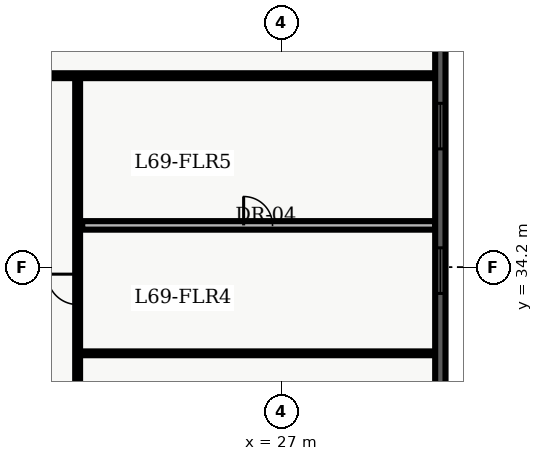
"""IFC4 building model, lengths in metres.
Left out: names, types, materials, properties, quantities, classifications, styles, units other than length and angle.
Written with IfcOpenShell. Run it as: python <this file> out.ifc"""

import sys

from ifc_helpers import new_model, entity, si_unit, converted_unit, direction, frame, origin_with_axes, origin_2d_with_axis, place, context, subcontext, project, spatial, polyline, rectangle, outline, extrude, element, fill, save


model = new_model("IFC4")
c1 = context("Model", 3, precision=1e-05, world=origin_with_axes(), true_north=direction((0.0, 1.0)))
c2 = subcontext(c1, "Body", "Model", "MODEL_VIEW")
j1 = project(units=[si_unit("LENGTHUNIT", "METRE"), converted_unit("PLANEANGLEUNIT", "DEGREE", entity("IfcPlaneAngleMeasure", 0.017), si_unit("PLANEANGLEUNIT", "RADIAN"), dimensions=[0, 0, 0, 0, 0, 0, 0])], contexts=[c1])
p1 = place(None, origin_with_axes())
s1 = spatial("IfcSite", under=j1, at=p1, CompositionType="ELEMENT")
p2 = place(p1, origin_with_axes())
s2 = spatial("IfcBuilding", under=s1, at=p2, CompositionType="ELEMENT")
p3 = place(p2, frame((0.0, 0.0, 280.2), z_axis=(0.0, 0.0, 1.0), x_axis=(1.0, 0.0, 0.0)))
s3 = spatial("IfcBuildingStorey", under=s2, at=p3, CompositionType="ELEMENT", Elevation=280.2)
p4 = place(p3, frame((8.135, 40.5, 0.0), z_axis=(0.0, 0.0, 1.0), x_axis=(1.0, 0.0, 0.0)))
e1 = element("IfcWall", 1, at=p4, inside=s3, PredefinedType="PARTITIONING", context=c2, shape_type="SweptSolid", body=[
    extrude(outline(polyline([(0.0, -0.08), (23.93, -0.08), (23.93, 0.08), (0.0, 0.08), (0.0, -0.08)])), origin_with_axes(), (0.0, 0.0, 1.0), 2.7),
])
p5 = place(p4, frame((0.871, 0.0, 0.0), z_axis=(0.0, 0.0, 1.0), x_axis=(1.0, 0.0, 0.0)))
e2 = element("IfcOpeningElement", 2, at=p5, cuts=e1, PredefinedType="OPENING", context=c2, shape_type="SweptSolid", body=[
    extrude(rectangle(XDim=1.0, YDim=0.18, at=origin_2d_with_axis()), origin_with_axes(), (0.0, 0.0, 1.0), 2.15),
])
p6 = place(p4, frame((6.56, 0.0, 0.0), z_axis=(0.0, 0.0, 1.0), x_axis=(1.0, 0.0, 0.0)))
e3 = element("IfcOpeningElement", 3, at=p6, cuts=e1, PredefinedType="OPENING", context=c2, shape_type="SweptSolid", body=[
    extrude(rectangle(XDim=1.0, YDim=0.18, at=origin_2d_with_axis()), origin_with_axes(), (0.0, 0.0, 1.0), 2.15),
])
p7 = place(p4, frame((10.16, 0.0, 0.0), z_axis=(0.0, 0.0, 1.0), x_axis=(1.0, 0.0, 0.0)))
e4 = element("IfcOpeningElement", 4, at=p7, cuts=e1, PredefinedType="OPENING", context=c2, shape_type="SweptSolid", body=[
    extrude(rectangle(XDim=1.0, YDim=0.18, at=origin_2d_with_axis()), origin_with_axes(), (0.0, 0.0, 1.0), 2.15),
])
p8 = place(p3, frame((20.3, 7.8, 0.0), z_axis=(0.0, 0.0, 1.0), x_axis=(0.0, 1.0, 0.0)))
e5 = element("IfcWall", 5, at=p8, inside=s3, PredefinedType="PARTITIONING", context=c2, shape_type="SweptSolid", body=[
    extrude(outline(polyline([(0.0, -0.08), (32.7, -0.08), (32.7, 0.08), (0.0, 0.08), (0.0, -0.08)])), origin_with_axes(), (0.0, 0.0, 1.0), 2.7),
])
p9 = place(p8, frame((14.2, 0.0, 0.0), z_axis=(0.0, 0.0, 1.0), x_axis=(1.0, 0.0, 0.0)))
e6 = element("IfcOpeningElement", 6, at=p9, cuts=e5, PredefinedType="OPENING", context=c2, shape_type="SweptSolid", body=[
    extrude(rectangle(XDim=1.0, YDim=0.18, at=origin_2d_with_axis()), origin_with_axes(), (0.0, 0.0, 1.0), 2.15),
])
p10 = place(p8, frame((18.24, 0.0, 0.0), z_axis=(0.0, 0.0, 1.0), x_axis=(1.0, 0.0, 0.0)))
e7 = element("IfcOpeningElement", 7, at=p10, cuts=e5, PredefinedType="OPENING", context=c2, shape_type="SweptSolid", body=[
    extrude(rectangle(XDim=1.0, YDim=0.18, at=origin_2d_with_axis()), origin_with_axes(), (0.0, 0.0, 1.0), 2.15),
])
p11 = place(p8, frame((22.011, 0.0, 0.0), z_axis=(0.0, 0.0, 1.0), x_axis=(1.0, 0.0, 0.0)))
e8 = element("IfcOpeningElement", 8, at=p11, cuts=e5, PredefinedType="OPENING", context=c2, shape_type="SweptSolid", body=[
    extrude(rectangle(XDim=1.0, YDim=0.18, at=origin_2d_with_axis()), origin_with_axes(), (0.0, 0.0, 1.0), 2.15),
])
p12 = place(p8, frame((25.672, 0.0, 0.0), z_axis=(0.0, 0.0, 1.0), x_axis=(1.0, 0.0, 0.0)))
e9 = element("IfcOpeningElement", 9, at=p12, cuts=e5, PredefinedType="OPENING", context=c2, shape_type="SweptSolid", body=[
    extrude(rectangle(XDim=1.0, YDim=0.18, at=origin_2d_with_axis()), origin_with_axes(), (0.0, 0.0, 1.0), 2.15),
])
p13 = place(p8, frame((6.675, 0.0, 0.0), z_axis=(0.0, 0.0, 1.0), x_axis=(1.0, 0.0, 0.0)))
e10 = element("IfcOpeningElement", 10, at=p13, cuts=e5, PredefinedType="OPENING", context=c2, shape_type="SweptSolid", body=[
    extrude(rectangle(XDim=1.05, YDim=0.18, at=origin_2d_with_axis()), origin_with_axes(), (0.0, 0.0, 1.0), 2.15),
])
p14 = place(p3, frame((20.45, 31.368, 0.0), z_axis=(0.0, 0.0, 1.0), x_axis=(1.0, 0.0, 0.0)))
e11 = element("IfcWall", 11, at=p14, inside=s3, PredefinedType="PARTITIONING", context=c2, shape_type="SweptSolid", body=[
    extrude(outline(polyline([(0.0, -0.062), (11.615, -0.062), (11.615, 0.062), (0.0, 0.062), (0.0, -0.062)])), origin_with_axes(), (0.0, 0.0, 1.0), 2.7),
])
p15 = place(p3, frame((20.45, 35.576, 0.0), z_axis=(0.0, 0.0, 1.0), x_axis=(1.0, 0.0, 0.0)))
e12 = element("IfcWall", 12, at=p15, inside=s3, PredefinedType="PARTITIONING", context=c2, shape_type="SweptSolid", body=[
    extrude(outline(polyline([(0.0, -0.14), (11.615, -0.14), (11.615, 0.14), (0.0, 0.14), (0.0, -0.14)])), origin_with_axes(), (0.0, 0.0, 1.0), 2.7),
])
p16 = place(p15, frame((5.785, 0.0, 0.0), z_axis=(0.0, 0.0, 1.0), x_axis=(1.0, 0.0, 0.0)))
e13 = element("IfcOpeningElement", 13, at=p16, cuts=e12, PredefinedType="OPENING", context=c2, shape_type="SweptSolid", body=[
    extrude(rectangle(XDim=0.95, YDim=0.3, at=origin_2d_with_axis()), origin_with_axes(), (0.0, 0.0, 1.0), 2.15),
])
p17 = place(p3, frame((32.23, 41.82, 0.0), z_axis=(0.0, 0.0, 1.0), x_axis=(0.0, -1.0, 0.0)))
e14 = element("IfcWall", 14, at=p17, inside=s3, PredefinedType="SOLIDWALL", context=c2, shape_type="SweptSolid", body=[
    extrude(outline(polyline([(0.0, -0.17), (20.22, -0.17), (20.22, 0.17), (0.0, 0.17), (0.0, -0.17)])), origin_with_axes(), (0.0, 0.0, 1.0), 3.66),
])
p18 = place(p17, frame((2.978, 0.0, 0.45), z_axis=(0.0, 0.0, 1.0), x_axis=(1.0, 0.0, 0.0)))
e15 = element("IfcOpeningElement", 15, at=p18, cuts=e14, PredefinedType="OPENING", context=c2, shape_type="SweptSolid", body=[
    extrude(rectangle(XDim=1.5, YDim=0.36, at=origin_2d_with_axis()), origin_with_axes(), (0.0, 0.0, 1.0), 2.1),
])
p19 = place(p17, frame((7.732, 0.0, 0.45), z_axis=(0.0, 0.0, 1.0), x_axis=(1.0, 0.0, 0.0)))
e16 = element("IfcOpeningElement", 16, at=p19, cuts=e14, PredefinedType="OPENING", context=c2, shape_type="SweptSolid", body=[
    extrude(rectangle(XDim=1.5, YDim=0.36, at=origin_2d_with_axis()), origin_with_axes(), (0.0, 0.0, 1.0), 2.1),
])
p20 = place(p17, frame((12.487, 0.0, 0.45), z_axis=(0.0, 0.0, 1.0), x_axis=(1.0, 0.0, 0.0)))
e17 = element("IfcOpeningElement", 17, at=p20, cuts=e14, PredefinedType="OPENING", context=c2, shape_type="SweptSolid", body=[
    extrude(rectangle(XDim=1.5, YDim=0.36, at=origin_2d_with_axis()), origin_with_axes(), (0.0, 0.0, 1.0), 2.1),
])
p21 = place(p8, frame((25.672, 0.0, 0.0), z_axis=(0.0, 0.0, 1.0), x_axis=(1.0, 0.0, 0.0)))
e18 = element("IfcDoor", 18, at=p21, inside=s3, OperationType="SINGLE_SWING_RIGHT", PredefinedType="DOOR", context=c2, shape_type="SweptSolid", body=[
    extrude(rectangle(XDim=1.0, YDim=0.09, at=origin_2d_with_axis()), origin_with_axes(), (0.0, 0.0, 1.0), 2.15),
])
fill(e9, e18)
p22 = place(p15, frame((5.785, 0.0, 0.0), z_axis=(0.0, 0.0, 1.0), x_axis=(1.0, 0.0, 0.0)))
e19 = element("IfcDoor", 19, at=p22, inside=s3, OperationType="SINGLE_SWING_LEFT", PredefinedType="DOOR", context=c2, shape_type="SweptSolid", body=[
    extrude(rectangle(XDim=0.95, YDim=0.09, at=origin_2d_with_axis()), origin_with_axes(), (0.0, 0.0, 1.0), 2.15),
])
fill(e13, e19)
p23 = place(p17, frame((2.978, 0.0, 0.45), z_axis=(0.0, 0.0, 1.0), x_axis=(1.0, 0.0, 0.0)))
e20 = element("IfcWindow", 20, at=p23, inside=s3, PredefinedType="WINDOW", context=c2, shape_type="SweptSolid", body=[
    extrude(rectangle(XDim=1.5, YDim=0.09, at=origin_2d_with_axis()), origin_with_axes(), (0.0, 0.0, 1.0), 2.1),
])
fill(e15, e20)
p24 = place(p17, frame((7.732, 0.0, 0.45), z_axis=(0.0, 0.0, 1.0), x_axis=(1.0, 0.0, 0.0)))
e21 = element("IfcWindow", 21, at=p24, inside=s3, PredefinedType="WINDOW", context=c2, shape_type="SweptSolid", body=[
    extrude(rectangle(XDim=1.5, YDim=0.09, at=origin_2d_with_axis()), origin_with_axes(), (0.0, 0.0, 1.0), 2.1),
])
fill(e16, e21)
save(model, sys.argv[1])
